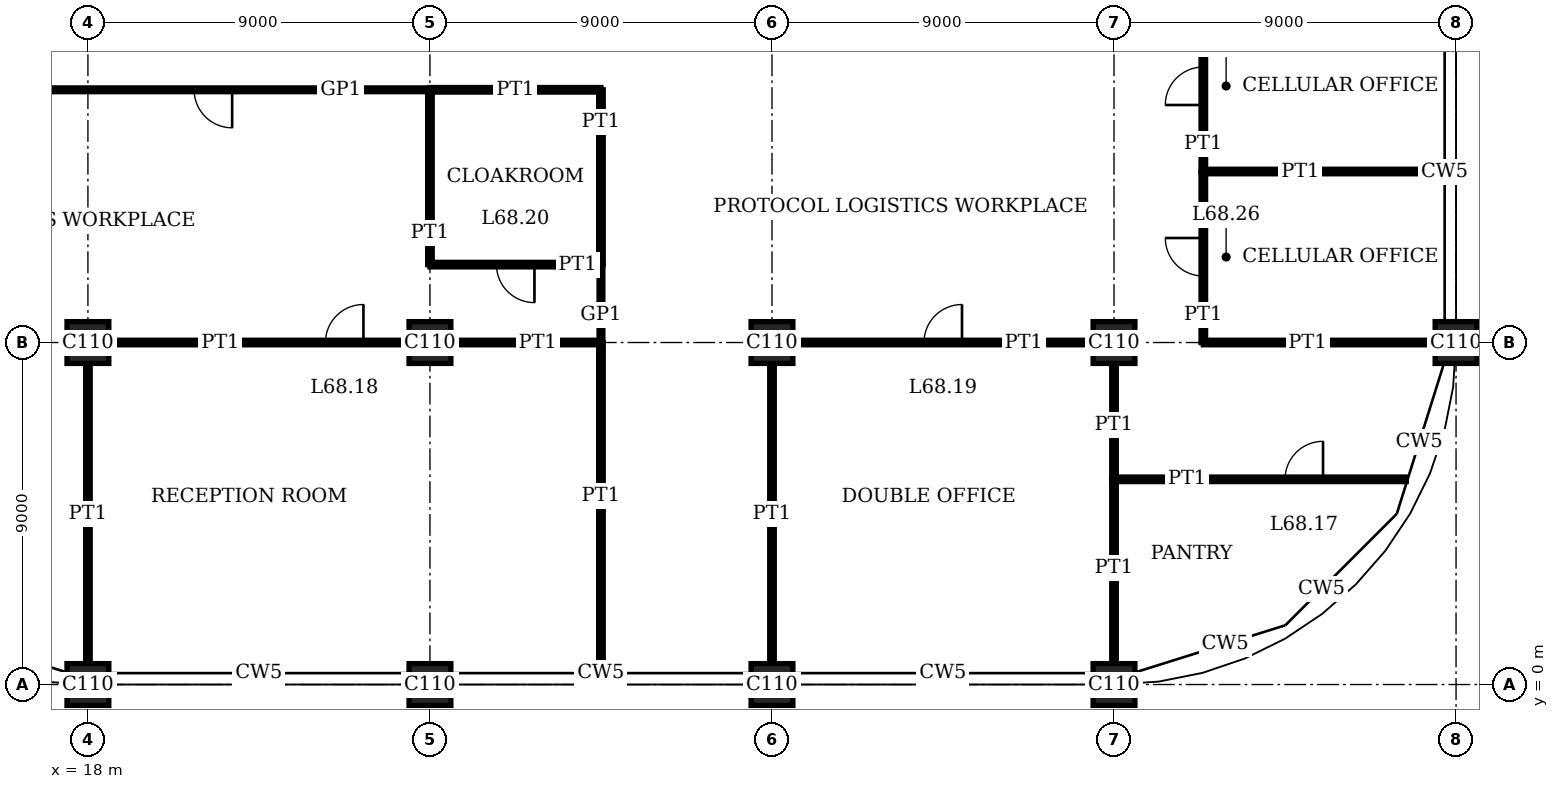
"""IFC4 building model, lengths in metres.
Left out: names, types, materials, properties, quantities, classifications, styles, units other than length and angle.
Written with IfcOpenShell. Run it as: python <this file> out.ifc"""

import sys

from ifc_helpers import new_model, si_unit, direction, frame, frame_2d, origin, origin_2d, place, context, subcontext, project, spatial, rectangle, extrude, element, fill, save


model = new_model("IFC4")
c1 = context("Model", 3, precision=1e-05, world=origin(), true_north=direction((0.0, 1.0)))
c2 = subcontext(c1, "Body", "Model", "MODEL_VIEW")
j1 = project(units=[si_unit("LENGTHUNIT", "METRE"), si_unit("PLANEANGLEUNIT", "RADIAN")], contexts=[c1])
p1 = place(None, origin())
s1 = spatial("IfcSite", under=j1, at=p1, CompositionType="ELEMENT")
p2 = place(p1, origin())
s2 = spatial("IfcBuilding", under=s1, at=p2, CompositionType="ELEMENT")
p3 = place(p2, frame((0.0, 0.0, 279.4)))
s3 = spatial("IfcBuildingStorey", under=s2, at=p3, CompositionType="ELEMENT", Elevation=279.4)
for number, where, z_axis, x_axis in (
    (1, (18.0, 0.0, 0.0), (0.0, 0.0, 1.0), (1.0, 0.0, 0.0)),
    (2, (18.0, 9.0, 0.0), (0.0, 0.0, 1.0), (1.0, 0.0, 0.0)),
    (3, (27.0, 0.0, 0.0), (0.0, 0.0, 1.0), (1.0, 0.0, 0.0)),
    (4, (27.0, 9.0, 0.0), (0.0, 0.0, 1.0), (1.0, 0.0, 0.0)),
    (5, (36.0, 0.0, 0.0), (0.0, 0.0, 1.0), (1.0, 0.0, 0.0)),
    (6, (36.0, 9.0, 0.0), (0.0, 0.0, 1.0), (1.0, 0.0, 0.0)),
    (7, (45.0, 0.0, 0.0), (0.0, 0.0, 1.0), (1.0, 0.0, 0.0)),
    (8, (45.0, 9.0, 0.0), (0.0, 0.0, 1.0), (1.0, 0.0, 0.0)),
    (9, (54.0, 9.0, 0.0), (0.0, 0.0, 1.0), (1.0, 0.0, 0.0)),
):
    element("IfcColumn", number, at=place(p3, frame(where, z_axis=z_axis, x_axis=x_axis)), inside=s3, PredefinedType="COLUMN", context=c2, shape_type="SweptSolid", body=[
        extrude(rectangle(XDim=1.1, YDim=1.1, at=origin_2d()), origin(), (0.0, 0.0, 1.0), 4.0),
    ])
p4 = place(p3, frame((45.0, 5.4, 0.0), z_axis=(0.0, 0.0, 1.0), x_axis=(1.0, 0.0, 0.0)))
e10 = element("IfcWall", 10, at=p4, inside=s3, PredefinedType="PARTITIONING", context=c2, shape_type="SweptSolid", body=[
    extrude(rectangle(XDim=7.69, YDim=0.12, at=frame_2d((3.845, 0.0))), origin(), (0.0, 0.0, 1.0), 3.75),
])
p5 = place(p4, frame((4.5, 0.0, 0.0)))
e11 = element("IfcOpeningElement", 11, at=p5, cuts=e10, PredefinedType="OPENING", context=c2, shape_type="SweptSolid", body=[
    extrude(rectangle(XDim=1.0, YDim=2.4, at=frame_2d((0.5, 1.2))), frame((0.0, 0.07, 0.0), z_axis=(0.0, -1.0, 0.0), x_axis=(1.0, 0.0, 0.0)), (0.0, 0.0, 1.0), 0.14),
])
p6 = place(p3, frame((18.55, 9.0, 0.0), z_axis=(0.0, 0.0, 1.0), x_axis=(1.0, 0.0, 0.0)))
e12 = element("IfcWall", 12, at=p6, inside=s3, PredefinedType="PARTITIONING", context=c2, shape_type="SweptSolid", body=[
    extrude(rectangle(XDim=7.9, YDim=0.12, at=frame_2d((3.95, 0.0))), origin(), (0.0, 0.0, 1.0), 3.05),
])
p7 = place(p6, frame((5.7, 0.0, 0.0)))
e13 = element("IfcOpeningElement", 13, at=p7, cuts=e12, PredefinedType="OPENING", context=c2, shape_type="SweptSolid", body=[
    extrude(rectangle(XDim=1.0, YDim=2.4, at=frame_2d((0.5, 1.2))), frame((0.0, 0.07, 0.0), z_axis=(0.0, -1.0, 0.0), x_axis=(1.0, 0.0, 0.0)), (0.0, 0.0, 1.0), 0.14),
])
p8 = place(p3, frame((27.55, 9.0, 0.0), z_axis=(0.0, 0.0, 1.0), x_axis=(1.0, 0.0, 0.0)))
e14 = element("IfcWall", 14, at=p8, inside=s3, PredefinedType="PARTITIONING", context=c2, shape_type="SweptSolid", body=[
    extrude(rectangle(XDim=3.95, YDim=0.12, at=frame_2d((1.975, 0.0))), origin(), (0.0, 0.0, 1.0), 3.05),
])
p9 = place(p3, frame((36.55, 9.0, 0.0), z_axis=(0.0, 0.0, 1.0), x_axis=(1.0, 0.0, 0.0)))
e15 = element("IfcWall", 15, at=p9, inside=s3, PredefinedType="PARTITIONING", context=c2, shape_type="SweptSolid", body=[
    extrude(rectangle(XDim=7.9, YDim=0.12, at=frame_2d((3.95, 0.0))), origin(), (0.0, 0.0, 1.0), 3.05),
])
p10 = place(p9, frame((3.45, 0.0, 0.0)))
e16 = element("IfcOpeningElement", 16, at=p10, cuts=e15, PredefinedType="OPENING", context=c2, shape_type="SweptSolid", body=[
    extrude(rectangle(XDim=1.0, YDim=2.4, at=frame_2d((0.5, 1.2))), frame((0.0, 0.07, 0.0), z_axis=(0.0, -1.0, 0.0), x_axis=(1.0, 0.0, 0.0)), (0.0, 0.0, 1.0), 0.14),
])
p11 = place(p3, frame((47.35, 9.0, 0.0), z_axis=(0.0, 0.0, 1.0), x_axis=(1.0, 0.0, 0.0)))
e17 = element("IfcWall", 17, at=p11, inside=s3, PredefinedType="PARTITIONING", context=c2, shape_type="SweptSolid", body=[
    extrude(rectangle(XDim=6.1, YDim=0.12, at=frame_2d((3.05, 0.0))), origin(), (0.0, 0.0, 1.0), 3.05),
])
p12 = place(p3, frame((27.0, 11.05, 0.0), z_axis=(0.0, 0.0, 1.0), x_axis=(1.0, 0.0, 0.0)))
e18 = element("IfcWall", 18, at=p12, inside=s3, PredefinedType="PARTITIONING", context=c2, shape_type="SweptSolid", body=[
    extrude(rectangle(XDim=4.5, YDim=0.12, at=frame_2d((2.25, 0.0))), origin(), (0.0, 0.0, 1.0), 3.75),
])
p13 = place(p12, frame((1.75, 0.0, 0.0)))
e19 = element("IfcOpeningElement", 19, at=p13, cuts=e18, PredefinedType="OPENING", context=c2, shape_type="SweptSolid", body=[
    extrude(rectangle(XDim=1.0, YDim=2.4, at=frame_2d((0.5, 1.2))), frame((0.0, 0.07, 0.0), z_axis=(0.0, -1.0, 0.0), x_axis=(1.0, 0.0, 0.0)), (0.0, 0.0, 1.0), 0.14),
])
p14 = place(p3, frame((47.35, 13.5, 0.0), z_axis=(0.0, 0.0, 1.0), x_axis=(1.0, 0.0, 0.0)))
e20 = element("IfcWall", 20, at=p14, inside=s3, PredefinedType="PARTITIONING", context=c2, shape_type="SweptSolid", body=[
    extrude(rectangle(XDim=6.34, YDim=0.12, at=frame_2d((3.17, 0.0))), origin(), (0.0, 0.0, 1.0), 3.1),
])
p15 = place(p3, frame((27.0, 15.65, 0.0), z_axis=(0.0, 0.0, 1.0), x_axis=(1.0, 0.0, 0.0)))
e21 = element("IfcWall", 21, at=p15, inside=s3, PredefinedType="PARTITIONING", context=c2, shape_type="SweptSolid", body=[
    extrude(rectangle(XDim=4.5, YDim=0.12, at=frame_2d((2.25, 0.0))), origin(), (0.0, 0.0, 1.0), 3.75),
])
p16 = place(p3, frame((15.6, 15.65, 0.0), z_axis=(0.0, 0.0, 1.0), x_axis=(1.0, 0.0, 0.0)))
e22 = element("IfcWall", 22, at=p16, inside=s3, PredefinedType="PARTITIONING", context=c2, shape_type="SweptSolid", body=[
    extrude(rectangle(XDim=11.39, YDim=0.1, at=frame_2d((5.695, 0.0))), origin(), (0.0, 0.0, 1.0), 3.75),
])
p17 = place(p16, frame((5.195, 0.0, 0.0)))
e23 = element("IfcOpeningElement", 23, at=p17, cuts=e22, PredefinedType="OPENING", context=c2, shape_type="SweptSolid", body=[
    extrude(rectangle(XDim=1.0, YDim=2.4, at=frame_2d((0.5, 1.2))), frame((0.0, 0.06, 0.0), z_axis=(0.0, -1.0, 0.0), x_axis=(1.0, 0.0, 0.0)), (0.0, 0.0, 1.0), 0.12),
])
p18 = place(p3, frame((18.0, 0.55, 0.0), z_axis=(0.0, 0.0, 1.0), x_axis=(0.0, 1.0, 0.0)))
e24 = element("IfcWall", 24, at=p18, inside=s3, PredefinedType="PARTITIONING", context=c2, shape_type="SweptSolid", body=[
    extrude(rectangle(XDim=7.9, YDim=0.12, at=frame_2d((3.95, 0.0))), origin(), (0.0, 0.0, 1.0), 3.05),
])
p19 = place(p3, frame((27.0, 11.05, 0.0), z_axis=(0.0, 0.0, 1.0), x_axis=(0.0, 1.0, 0.0)))
e25 = element("IfcWall", 25, at=p19, inside=s3, PredefinedType="PARTITIONING", context=c2, shape_type="SweptSolid", body=[
    extrude(rectangle(XDim=4.6, YDim=0.12, at=frame_2d((2.3, 0.0))), origin(), (0.0, 0.0, 1.0), 3.05),
])
p20 = place(p3, frame((31.5, 0.31, 0.0), z_axis=(0.0, 0.0, 1.0), x_axis=(0.0, 1.0, 0.0)))
e26 = element("IfcWall", 26, at=p20, inside=s3, PredefinedType="PARTITIONING", context=c2, shape_type="SweptSolid", body=[
    extrude(rectangle(XDim=8.69, YDim=0.12, at=frame_2d((4.345, 0.0))), origin(), (0.0, 0.0, 1.0), 3.75),
])
p21 = place(p3, frame((31.5, 11.05, 0.0), z_axis=(0.0, 0.0, 1.0), x_axis=(0.0, 1.0, 0.0)))
e27 = element("IfcWall", 27, at=p21, inside=s3, PredefinedType="PARTITIONING", context=c2, shape_type="SweptSolid", body=[
    extrude(rectangle(XDim=4.6, YDim=0.12, at=frame_2d((2.3, 0.0))), origin(), (0.0, 0.0, 1.0), 3.75),
])
p22 = place(p3, frame((31.5, 9.0, 0.0), z_axis=(0.0, 0.0, 1.0), x_axis=(0.0, 1.0, 0.0)))
e28 = element("IfcWall", 28, at=p22, inside=s3, PredefinedType="PARTITIONING", context=c2, shape_type="SweptSolid", body=[
    extrude(rectangle(XDim=2.05, YDim=0.1, at=frame_2d((1.025, 0.0))), origin(), (0.0, 0.0, 1.0), 3.75),
])
p23 = place(p3, frame((36.0, 0.55, 0.0), z_axis=(0.0, 0.0, 1.0), x_axis=(0.0, 1.0, 0.0)))
e29 = element("IfcWall", 29, at=p23, inside=s3, PredefinedType="PARTITIONING", context=c2, shape_type="SweptSolid", body=[
    extrude(rectangle(XDim=7.9, YDim=0.12, at=frame_2d((3.95, 0.0))), origin(), (0.0, 0.0, 1.0), 3.05),
])
p24 = place(p3, frame((45.0, 0.55, 0.0), z_axis=(0.0, 0.0, 1.0), x_axis=(0.0, 1.0, 0.0)))
e30 = element("IfcWall", 30, at=p24, inside=s3, PredefinedType="PARTITIONING", context=c2, shape_type="SweptSolid", body=[
    extrude(rectangle(XDim=4.85, YDim=0.12, at=frame_2d((2.425, 0.0))), origin(), (0.0, 0.0, 1.0), 3.05),
])
p25 = place(p3, frame((45.0, 5.4, 0.0), z_axis=(0.0, 0.0, 1.0), x_axis=(0.0, 1.0, 0.0)))
e31 = element("IfcWall", 31, at=p25, inside=s3, PredefinedType="PARTITIONING", context=c2, shape_type="SweptSolid", body=[
    extrude(rectangle(XDim=3.05, YDim=0.12, at=frame_2d((1.525, 0.0))), origin(), (0.0, 0.0, 1.0), 3.05),
])
p26 = place(p3, frame((47.35, 9.0, 0.0), z_axis=(0.0, 0.0, 1.0), x_axis=(0.0, 1.0, 0.0)))
e32 = element("IfcWall", 32, at=p26, inside=s3, PredefinedType="PARTITIONING", context=c2, shape_type="SweptSolid", body=[
    extrude(rectangle(XDim=4.5, YDim=0.12, at=frame_2d((2.25, 0.0))), origin(), (0.0, 0.0, 1.0), 3.75),
])
p27 = place(p26, frame((1.75, 0.0, 0.0)))
e33 = element("IfcOpeningElement", 33, at=p27, cuts=e32, PredefinedType="OPENING", context=c2, shape_type="SweptSolid", body=[
    extrude(rectangle(XDim=1.0, YDim=2.4, at=frame_2d((0.5, 1.2))), frame((0.0, 0.07, 0.0), z_axis=(0.0, -1.0, 0.0), x_axis=(1.0, 0.0, 0.0)), (0.0, 0.0, 1.0), 0.14),
])
p28 = place(p3, frame((47.35, 13.5, 0.0), z_axis=(0.0, 0.0, 1.0), x_axis=(0.0, 1.0, 0.0)))
e34 = element("IfcWall", 34, at=p28, inside=s3, PredefinedType="PARTITIONING", context=c2, shape_type="SweptSolid", body=[
    extrude(rectangle(XDim=4.5, YDim=0.12, at=frame_2d((2.25, 0.0))), origin(), (0.0, 0.0, 1.0), 3.75),
])
p29 = place(p28, frame((1.75, 0.0, 0.0)))
e35 = element("IfcOpeningElement", 35, at=p29, cuts=e34, PredefinedType="OPENING", context=c2, shape_type="SweptSolid", body=[
    extrude(rectangle(XDim=1.0, YDim=2.4, at=frame_2d((0.5, 1.2))), frame((0.0, 0.07, 0.0), z_axis=(0.0, -1.0, 0.0), x_axis=(1.0, 0.0, 0.0)), (0.0, 0.0, 1.0), 0.14),
])
p30 = place(p5, origin())
e36 = element("IfcDoor", 36, at=p30, inside=s3, OperationType="SINGLE_SWING_LEFT", PredefinedType="DOOR", context=c2, shape_type="SweptSolid", body=[
    extrude(rectangle(XDim=1.0, YDim=2.4, at=frame_2d((0.5, 1.2))), frame((0.0, 0.025, 0.0), z_axis=(0.0, -1.0, 0.0), x_axis=(1.0, 0.0, 0.0)), (0.0, 0.0, 1.0), 0.05),
])
fill(e11, e36)
p31 = place(p7, origin())
e37 = element("IfcDoor", 37, at=p31, inside=s3, OperationType="SINGLE_SWING_LEFT", PredefinedType="DOOR", context=c2, shape_type="SweptSolid", body=[
    extrude(rectangle(XDim=1.0, YDim=2.4, at=frame_2d((0.5, 1.2))), frame((0.0, 0.025, 0.0), z_axis=(0.0, -1.0, 0.0), x_axis=(1.0, 0.0, 0.0)), (0.0, 0.0, 1.0), 0.05),
])
fill(e13, e37)
p32 = place(p10, origin())
e38 = element("IfcDoor", 38, at=p32, inside=s3, OperationType="SINGLE_SWING_LEFT", PredefinedType="DOOR", context=c2, shape_type="SweptSolid", body=[
    extrude(rectangle(XDim=1.0, YDim=2.4, at=frame_2d((0.5, 1.2))), frame((0.0, 0.025, 0.0), z_axis=(0.0, -1.0, 0.0), x_axis=(1.0, 0.0, 0.0)), (0.0, 0.0, 1.0), 0.05),
])
fill(e16, e38)
p33 = place(p13, origin())
e39 = element("IfcDoor", 39, at=p33, inside=s3, OperationType="SINGLE_SWING_RIGHT", PredefinedType="DOOR", context=c2, shape_type="SweptSolid", body=[
    extrude(rectangle(XDim=1.0, YDim=2.4, at=frame_2d((0.5, 1.2))), frame((0.0, 0.025, 0.0), z_axis=(0.0, -1.0, 0.0), x_axis=(1.0, 0.0, 0.0)), (0.0, 0.0, 1.0), 0.05),
])
fill(e19, e39)
p34 = place(p17, origin())
e40 = element("IfcDoor", 40, at=p34, inside=s3, OperationType="SINGLE_SWING_RIGHT", PredefinedType="DOOR", context=c2, shape_type="SweptSolid", body=[
    extrude(rectangle(XDim=1.0, YDim=2.4, at=frame_2d((0.5, 1.2))), frame((0.0, 0.02, 0.0), z_axis=(0.0, -1.0, 0.0), x_axis=(1.0, 0.0, 0.0)), (0.0, 0.0, 1.0), 0.04),
])
fill(e23, e40)
p35 = place(p27, origin())
e41 = element("IfcDoor", 41, at=p35, inside=s3, OperationType="SINGLE_SWING_LEFT", PredefinedType="DOOR", context=c2, shape_type="SweptSolid", body=[
    extrude(rectangle(XDim=1.0, YDim=2.4, at=frame_2d((0.5, 1.2))), frame((0.0, 0.025, 0.0), z_axis=(0.0, -1.0, 0.0), x_axis=(1.0, 0.0, 0.0)), (0.0, 0.0, 1.0), 0.05),
])
fill(e33, e41)
p36 = place(p29, origin())
e42 = element("IfcDoor", 42, at=p36, inside=s3, OperationType="SINGLE_SWING_RIGHT", PredefinedType="DOOR", context=c2, shape_type="SweptSolid", body=[
    extrude(rectangle(XDim=1.0, YDim=2.4, at=frame_2d((0.5, 1.2))), frame((0.0, 0.025, 0.0), z_axis=(0.0, -1.0, 0.0), x_axis=(1.0, 0.0, 0.0)), (0.0, 0.0, 1.0), 0.05),
])
fill(e35, e42)
save(model, sys.argv[1])
